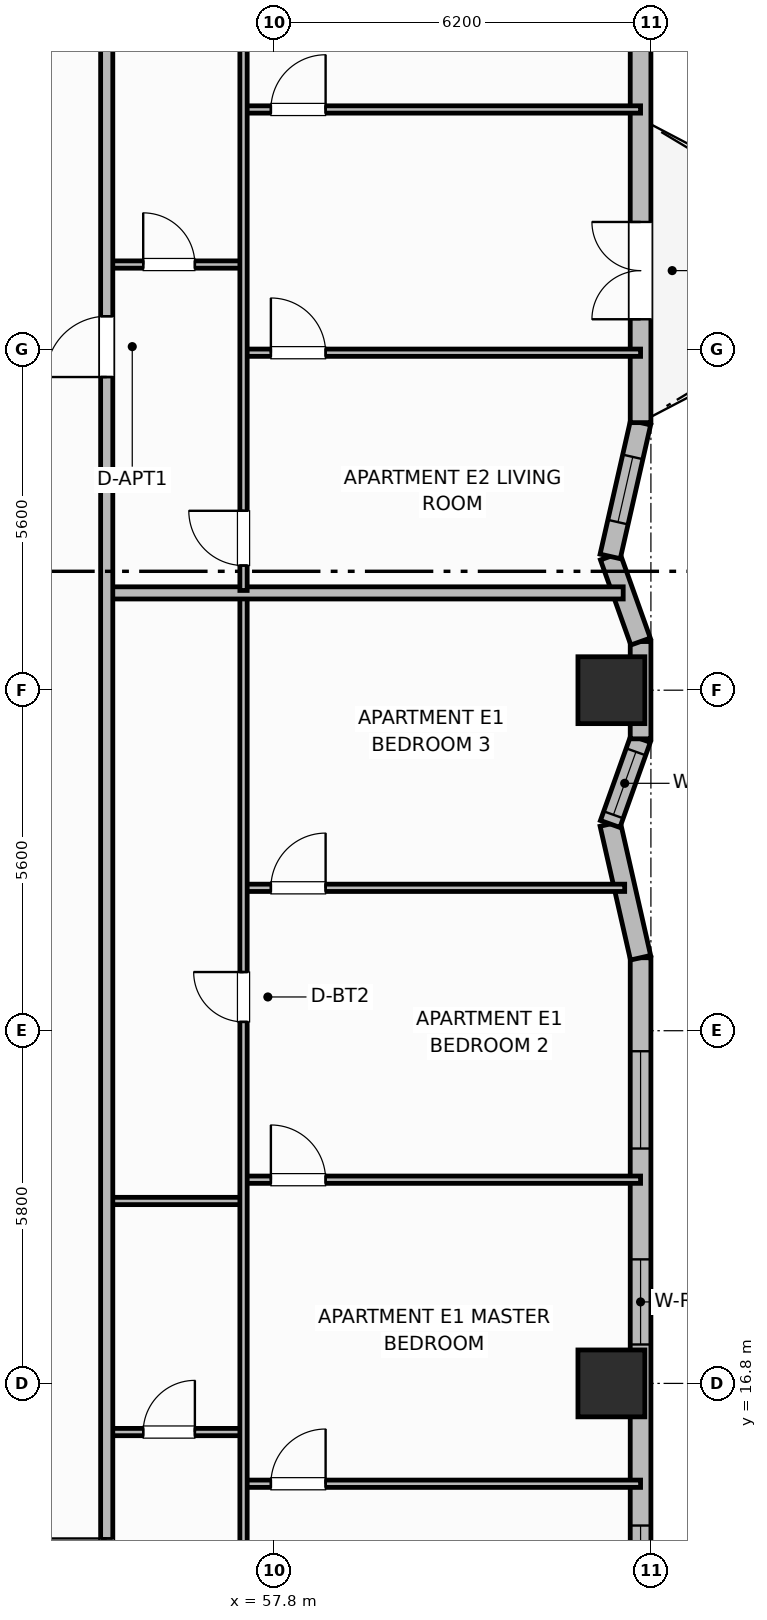
"""IFC4 building model, lengths in metres.
Left out: names, types, materials, properties, quantities, classifications, styles, units other than length and angle.
Written with IfcOpenShell. Run it as: python <this file> out.ifc"""

import sys

from ifc_helpers import new_model, si_unit, direction, frame, frame_2d, origin, origin_2d, place, context, subcontext, project, spatial, rectangle, extrude, element, fill, save


model = new_model("IFC4")
c1 = context("Model", 3, precision=1e-05, world=origin(), true_north=direction((0.0, 1.0)))
c2 = subcontext(c1, "Body", "Model", "MODEL_VIEW")
j1 = project(units=[si_unit("LENGTHUNIT", "METRE"), si_unit("PLANEANGLEUNIT", "RADIAN")], contexts=[c1])
p1 = place(None, origin())
s1 = spatial("IfcSite", under=j1, at=p1, CompositionType="ELEMENT")
p2 = place(p1, origin())
s2 = spatial("IfcBuilding", under=s1, at=p2, CompositionType="ELEMENT")
p3 = place(p2, frame((0.0, 0.0, 84.1)))
s3 = spatial("IfcBuildingStorey", under=s2, at=p3, CompositionType="ELEMENT", Elevation=84.1)
for number, where, z_axis, x_axis in (
    (1, (63.35, 16.8, 0.0), (0.0, 0.0, 1.0), (1.0, 0.0, 0.0)),
    (2, (63.35, 28.2, 0.0), (0.0, 0.0, 1.0), (1.0, 0.0, 0.0)),
):
    element("IfcColumn", number, at=place(p3, frame(where, z_axis=z_axis, x_axis=x_axis)), inside=s3, PredefinedType="COLUMN", context=c2, shape_type="SweptSolid", body=[
        extrude(rectangle(XDim=1.1, YDim=1.1, at=origin_2d()), origin(), (0.0, 0.0, 1.0), 4.2),
    ])
p4 = place(p3, frame((63.83, 9.0, 0.0), z_axis=(0.0, 0.0, 1.0), x_axis=(0.0, 1.0, 0.0)))
e3 = element("IfcWall", 3, at=p4, inside=s3, PredefinedType="SOLIDWALL", context=c2, shape_type="SweptSolid", body=[
    extrude(rectangle(XDim=14.8, YDim=0.34, at=frame_2d((7.4, 0.0))), origin(), (0.0, 0.0, 1.0), 3.2),
])
p5 = place(p4, frame((3.863, 0.0, 0.85)))
e4 = element("IfcOpeningElement", 4, at=p5, cuts=e3, PredefinedType="OPENING", context=c2, shape_type="SweptSolid", body=[
    extrude(rectangle(XDim=1.6, YDim=1.9, at=frame_2d((0.8, 0.95))), frame((0.0, 0.18, 0.0), z_axis=(0.0, -1.0, 0.0), x_axis=(1.0, 0.0, 0.0)), (0.0, 0.0, 1.0), 0.36),
])
p6 = place(p4, frame((8.44, 0.0, 0.85)))
e5 = element("IfcOpeningElement", 5, at=p6, cuts=e3, PredefinedType="OPENING", context=c2, shape_type="SweptSolid", body=[
    extrude(rectangle(XDim=1.4, YDim=1.85, at=frame_2d((0.7, 0.925))), frame((0.0, 0.18, 0.0), z_axis=(0.0, -1.0, 0.0), x_axis=(1.0, 0.0, 0.0)), (0.0, 0.0, 1.0), 0.36),
])
p7 = place(p4, frame((11.663, 0.0, 0.85)))
e6 = element("IfcOpeningElement", 6, at=p7, cuts=e3, PredefinedType="OPENING", context=c2, shape_type="SweptSolid", body=[
    extrude(rectangle(XDim=1.6, YDim=1.9, at=frame_2d((0.8, 0.95))), frame((0.0, 0.18, 0.0), z_axis=(0.0, -1.0, 0.0), x_axis=(1.0, 0.0, 0.0)), (0.0, 0.0, 1.0), 0.36),
])
p8 = place(p3, frame((63.83, 23.8, 0.0), z_axis=(0.0, 0.0, 1.0), x_axis=(-0.221625780886, 0.975131792758, 0.0)))
e7 = element("IfcWall", 7, at=p8, inside=s3, PredefinedType="SOLIDWALL", context=c2, shape_type="SweptSolid", body=[
    extrude(rectangle(XDim=2.256, YDim=0.34, at=frame_2d((1.128, 0.0))), origin(), (0.0, 0.0, 1.0), 3.2),
])
p9 = place(p3, frame((63.33, 26.0, 0.0), z_axis=(0.0, 0.0, 1.0), x_axis=(0.336357205213, 0.94173447983, 0.0)))
e8 = element("IfcWall", 8, at=p9, inside=s3, PredefinedType="SOLIDWALL", context=c2, shape_type="SweptSolid", body=[
    extrude(rectangle(XDim=1.487, YDim=0.34, at=frame_2d((0.743, 0.0))), origin(), (0.0, 0.0, 1.0), 3.2),
])
p10 = place(p9, frame((0.16, 0.0, 0.95)))
e9 = element("IfcOpeningElement", 9, at=p10, cuts=e8, PredefinedType="OPENING", context=c2, shape_type="SweptSolid", body=[
    extrude(rectangle(XDim=1.1, YDim=1.65, at=frame_2d((0.55, 0.825))), frame((0.0, 0.18, 0.0), z_axis=(0.0, -1.0, 0.0), x_axis=(1.0, 0.0, 0.0)), (0.0, 0.0, 1.0), 0.36),
])
p11 = place(p3, frame((63.83, 27.4, 0.0), z_axis=(0.0, 0.0, 1.0), x_axis=(0.0, 1.0, 0.0)))
e10 = element("IfcWall", 10, at=p11, inside=s3, PredefinedType="SOLIDWALL", context=c2, shape_type="SweptSolid", body=[
    extrude(rectangle(XDim=1.6, YDim=0.34, at=frame_2d((0.8, 0.0))), origin(), (0.0, 0.0, 1.0), 3.2),
])
p12 = place(p3, frame((63.83, 29.0, 0.0), z_axis=(0.0, 0.0, 1.0), x_axis=(-0.336357205213, 0.94173447983, 0.0)))
e11 = element("IfcWall", 11, at=p12, inside=s3, PredefinedType="SOLIDWALL", context=c2, shape_type="SweptSolid", body=[
    extrude(rectangle(XDim=1.487, YDim=0.34, at=frame_2d((0.743, 0.0))), origin(), (0.0, 0.0, 1.0), 3.2),
])
p13 = place(p3, frame((63.33, 30.4, 0.0), z_axis=(0.0, 0.0, 1.0), x_axis=(0.221602396322, 0.975137107254, 0.0)))
e12 = element("IfcWall", 12, at=p13, inside=s3, PredefinedType="SOLIDWALL", context=c2, shape_type="SweptSolid", body=[
    extrude(rectangle(XDim=2.256, YDim=0.34, at=frame_2d((1.128, 0.0))), origin(), (0.0, 0.0, 1.0), 3.2),
])
p14 = place(p13, frame((0.578, 0.0, 0.95)))
e13 = element("IfcOpeningElement", 13, at=p14, cuts=e12, PredefinedType="OPENING", context=c2, shape_type="SweptSolid", body=[
    extrude(rectangle(XDim=1.1, YDim=1.65, at=frame_2d((0.55, 0.825))), frame((0.0, 0.18, 0.0), z_axis=(0.0, -1.0, 0.0), x_axis=(1.0, 0.0, 0.0)), (0.0, 0.0, 1.0), 0.36),
])
p15 = place(p3, frame((63.83, 32.6, 0.0), z_axis=(0.0, 0.0, 1.0), x_axis=(0.0, 1.0, 0.0)))
e14 = element("IfcWall", 14, at=p15, inside=s3, PredefinedType="SOLIDWALL", context=c2, shape_type="SweptSolid", body=[
    extrude(rectangle(XDim=14.8, YDim=0.34, at=frame_2d((7.4, 0.0))), origin(), (0.0, 0.0, 1.0), 3.2),
])
p16 = place(p15, frame((1.7, 0.0, 0.0)))
e15 = element("IfcOpeningElement", 15, at=p16, cuts=e14, PredefinedType="OPENING", context=c2, shape_type="SweptSolid", body=[
    extrude(rectangle(XDim=1.6, YDim=2.1, at=frame_2d((0.8, 1.05))), frame((0.0, 0.18, 0.0), z_axis=(0.0, -1.0, 0.0), x_axis=(1.0, 0.0, 0.0)), (0.0, 0.0, 1.0), 0.36),
])
p17 = place(p15, frame((7.6, 0.0, 0.95)))
e16 = element("IfcOpeningElement", 16, at=p17, cuts=e14, PredefinedType="OPENING", context=c2, shape_type="SweptSolid", body=[
    extrude(rectangle(XDim=1.1, YDim=1.65, at=frame_2d((0.55, 0.825))), frame((0.0, 0.18, 0.0), z_axis=(0.0, -1.0, 0.0), x_axis=(1.0, 0.0, 0.0)), (0.0, 0.0, 1.0), 0.36),
])
p18 = place(p15, frame((10.48, 0.0, 0.85)))
e17 = element("IfcOpeningElement", 17, at=p18, cuts=e14, PredefinedType="OPENING", context=c2, shape_type="SweptSolid", body=[
    extrude(rectangle(XDim=1.4, YDim=1.85, at=frame_2d((0.7, 0.925))), frame((0.0, 0.18, 0.0), z_axis=(0.0, -1.0, 0.0), x_axis=(1.0, 0.0, 0.0)), (0.0, 0.0, 1.0), 0.36),
])
p19 = place(p3, frame((55.05, 16.0, 0.0), z_axis=(0.0, 0.0, 1.0), x_axis=(1.0, 0.0, 0.0)))
e18 = element("IfcWall", 18, at=p19, inside=s3, PredefinedType="PARTITIONING", context=c2, shape_type="SweptSolid", body=[
    extrude(rectangle(XDim=2.25, YDim=0.12, at=frame_2d((1.125, 0.0))), origin(), (0.0, 0.0, 1.0), 3.03),
])
p20 = place(p19, frame((0.6, 0.0, 0.0)))
e19 = element("IfcOpeningElement", 19, at=p20, cuts=e18, PredefinedType="OPENING", context=c2, shape_type="SweptSolid", body=[
    extrude(rectangle(XDim=0.85, YDim=2.1, at=frame_2d((0.425, 1.05))), frame((0.0, 0.07, 0.0), z_axis=(0.0, -1.0, 0.0), x_axis=(1.0, 0.0, 0.0)), (0.0, 0.0, 1.0), 0.14),
])
p21 = place(p3, frame((55.05, 19.8, 0.0), z_axis=(0.0, 0.0, 1.0), x_axis=(1.0, 0.0, 0.0)))
e20 = element("IfcWall", 20, at=p21, inside=s3, PredefinedType="PARTITIONING", context=c2, shape_type="SweptSolid", body=[
    extrude(rectangle(XDim=2.25, YDim=0.12, at=frame_2d((1.125, 0.0))), origin(), (0.0, 0.0, 1.0), 3.03),
])
p22 = place(p3, frame((57.3, 15.15, 0.0), z_axis=(0.0, 0.0, 1.0), x_axis=(1.0, 0.0, 0.0)))
e21 = element("IfcWall", 21, at=p22, inside=s3, PredefinedType="PARTITIONING", context=c2, shape_type="SweptSolid", body=[
    extrude(rectangle(XDim=6.53, YDim=0.12, at=frame_2d((3.265, 0.0))), origin(), (0.0, 0.0, 1.0), 3.03),
])
p23 = place(p22, frame((0.45, 0.0, 0.0)))
e22 = element("IfcOpeningElement", 22, at=p23, cuts=e21, PredefinedType="OPENING", context=c2, shape_type="SweptSolid", body=[
    extrude(rectangle(XDim=0.9, YDim=2.1, at=frame_2d((0.45, 1.05))), frame((0.0, 0.07, 0.0), z_axis=(0.0, -1.0, 0.0), x_axis=(1.0, 0.0, 0.0)), (0.0, 0.0, 1.0), 0.14),
])
p24 = place(p3, frame((57.3, 20.15, 0.0), z_axis=(0.0, 0.0, 1.0), x_axis=(1.0, 0.0, 0.0)))
e23 = element("IfcWall", 23, at=p24, inside=s3, PredefinedType="PARTITIONING", context=c2, shape_type="SweptSolid", body=[
    extrude(rectangle(XDim=6.53, YDim=0.12, at=frame_2d((3.265, 0.0))), origin(), (0.0, 0.0, 1.0), 3.03),
])
p25 = place(p24, frame((0.45, 0.0, 0.0)))
e24 = element("IfcOpeningElement", 24, at=p25, cuts=e23, PredefinedType="OPENING", context=c2, shape_type="SweptSolid", body=[
    extrude(rectangle(XDim=0.9, YDim=2.1, at=frame_2d((0.45, 1.05))), frame((0.0, 0.07, 0.0), z_axis=(0.0, -1.0, 0.0), x_axis=(1.0, 0.0, 0.0)), (0.0, 0.0, 1.0), 0.14),
])
p26 = place(p3, frame((57.3, 24.95, 0.0), z_axis=(0.0, 0.0, 1.0), x_axis=(1.0, 0.0, 0.0)))
e25 = element("IfcWall", 25, at=p26, inside=s3, PredefinedType="PARTITIONING", context=c2, shape_type="SweptSolid", body=[
    extrude(rectangle(XDim=6.269, YDim=0.12, at=frame_2d((3.134, 0.0))), origin(), (0.0, 0.0, 1.0), 3.03),
])
p27 = place(p26, frame((0.45, 0.0, 0.0)))
e26 = element("IfcOpeningElement", 26, at=p27, cuts=e25, PredefinedType="OPENING", context=c2, shape_type="SweptSolid", body=[
    extrude(rectangle(XDim=0.9, YDim=2.1, at=frame_2d((0.45, 1.05))), frame((0.0, 0.07, 0.0), z_axis=(0.0, -1.0, 0.0), x_axis=(1.0, 0.0, 0.0)), (0.0, 0.0, 1.0), 0.14),
])
p28 = place(p3, frame((57.3, 10.64, 0.0), z_axis=(0.0, 0.0, 1.0), x_axis=(0.0, 1.0, 0.0)))
e27 = element("IfcWall", 27, at=p28, inside=s3, PredefinedType="PARTITIONING", context=c2, shape_type="SweptSolid", body=[
    extrude(rectangle(XDim=19.12, YDim=0.12, at=frame_2d((9.56, 0.0))), origin(), (0.0, 0.0, 1.0), 3.03),
])
p29 = place(p28, frame((0.41, 0.0, 0.0)))
e28 = element("IfcOpeningElement", 28, at=p29, cuts=e27, PredefinedType="OPENING", context=c2, shape_type="SweptSolid", body=[
    extrude(rectangle(XDim=0.9, YDim=2.1, at=frame_2d((0.45, 1.05))), frame((0.0, 0.07, 0.0), z_axis=(0.0, -1.0, 0.0), x_axis=(1.0, 0.0, 0.0)), (0.0, 0.0, 1.0), 0.14),
])
p30 = place(p28, frame((12.105, 0.0, 0.0)))
e29 = element("IfcOpeningElement", 29, at=p30, cuts=e27, PredefinedType="OPENING", context=c2, shape_type="SweptSolid", body=[
    extrude(rectangle(XDim=0.82, YDim=2.08, at=frame_2d((0.41, 1.04))), frame((0.0, 0.07, 0.0), z_axis=(0.0, -1.0, 0.0), x_axis=(1.0, 0.0, 0.0)), (0.0, 0.0, 1.0), 0.14),
])
p31 = place(p3, frame((55.05, 29.8, 0.0), z_axis=(0.0, 0.0, 1.0), x_axis=(1.0, 0.0, 0.0)))
e30 = element("IfcWall", 30, at=p31, inside=s3, PredefinedType="PARTITIONING", context=c2, shape_type="SweptSolid", body=[
    extrude(rectangle(XDim=8.494, YDim=0.2, at=frame_2d((4.247, 0.0))), origin(), (0.0, 0.0, 1.0), 3.03),
])
p32 = place(p3, frame((55.05, 35.2, 0.0), z_axis=(0.0, 0.0, 1.0), x_axis=(1.0, 0.0, 0.0)))
e31 = element("IfcWall", 31, at=p32, inside=s3, PredefinedType="PARTITIONING", context=c2, shape_type="SweptSolid", body=[
    extrude(rectangle(XDim=2.25, YDim=0.12, at=frame_2d((1.125, 0.0))), origin(), (0.0, 0.0, 1.0), 3.03),
])
p33 = place(p32, frame((0.6, 0.0, 0.0)))
e32 = element("IfcOpeningElement", 32, at=p33, cuts=e31, PredefinedType="OPENING", context=c2, shape_type="SweptSolid", body=[
    extrude(rectangle(XDim=0.85, YDim=2.1, at=frame_2d((0.425, 1.05))), frame((0.0, 0.07, 0.0), z_axis=(0.0, -1.0, 0.0), x_axis=(1.0, 0.0, 0.0)), (0.0, 0.0, 1.0), 0.14),
])
p34 = place(p3, frame((57.3, 33.75, 0.0), z_axis=(0.0, 0.0, 1.0), x_axis=(1.0, 0.0, 0.0)))
e33 = element("IfcWall", 33, at=p34, inside=s3, PredefinedType="PARTITIONING", context=c2, shape_type="SweptSolid", body=[
    extrude(rectangle(XDim=6.53, YDim=0.12, at=frame_2d((3.265, 0.0))), origin(), (0.0, 0.0, 1.0), 3.03),
])
p35 = place(p34, frame((0.45, 0.0, 0.0)))
e34 = element("IfcOpeningElement", 34, at=p35, cuts=e33, PredefinedType="OPENING", context=c2, shape_type="SweptSolid", body=[
    extrude(rectangle(XDim=0.9, YDim=2.1, at=frame_2d((0.45, 1.05))), frame((0.0, 0.07, 0.0), z_axis=(0.0, -1.0, 0.0), x_axis=(1.0, 0.0, 0.0)), (0.0, 0.0, 1.0), 0.14),
])
p36 = place(p3, frame((57.3, 37.75, 0.0), z_axis=(0.0, 0.0, 1.0), x_axis=(1.0, 0.0, 0.0)))
e35 = element("IfcWall", 35, at=p36, inside=s3, PredefinedType="PARTITIONING", context=c2, shape_type="SweptSolid", body=[
    extrude(rectangle(XDim=6.53, YDim=0.12, at=frame_2d((3.265, 0.0))), origin(), (0.0, 0.0, 1.0), 3.03),
])
p37 = place(p36, frame((0.45, 0.0, 0.0)))
e36 = element("IfcOpeningElement", 36, at=p37, cuts=e35, PredefinedType="OPENING", context=c2, shape_type="SweptSolid", body=[
    extrude(rectangle(XDim=0.9, YDim=2.1, at=frame_2d((0.45, 1.05))), frame((0.0, 0.07, 0.0), z_axis=(0.0, -1.0, 0.0), x_axis=(1.0, 0.0, 0.0)), (0.0, 0.0, 1.0), 0.14),
])
p38 = place(p3, frame((57.3, 29.84, 0.0), z_axis=(0.0, 0.0, 1.0), x_axis=(0.0, 1.0, 0.0)))
e37 = element("IfcWall", 37, at=p38, inside=s3, PredefinedType="PARTITIONING", context=c2, shape_type="SweptSolid", body=[
    extrude(rectangle(XDim=15.92, YDim=0.12, at=frame_2d((7.96, 0.0))), origin(), (0.0, 0.0, 1.0), 3.03),
])
p39 = place(p38, frame((0.41, 0.0, 0.0)))
e38 = element("IfcOpeningElement", 38, at=p39, cuts=e37, PredefinedType="OPENING", context=c2, shape_type="SweptSolid", body=[
    extrude(rectangle(XDim=0.9, YDim=2.1, at=frame_2d((0.45, 1.05))), frame((0.0, 0.07, 0.0), z_axis=(0.0, -1.0, 0.0), x_axis=(1.0, 0.0, 0.0)), (0.0, 0.0, 1.0), 0.14),
])
p40 = place(p38, frame((13.125, 0.0, 0.0)))
e39 = element("IfcOpeningElement", 39, at=p40, cuts=e37, PredefinedType="OPENING", context=c2, shape_type="SweptSolid", body=[
    extrude(rectangle(XDim=0.82, YDim=2.08, at=frame_2d((0.41, 1.04))), frame((0.0, 0.07, 0.0), z_axis=(0.0, -1.0, 0.0), x_axis=(1.0, 0.0, 0.0)), (0.0, 0.0, 1.0), 0.14),
])
p41 = place(p3, frame((55.05, 10.6, 0.0), z_axis=(0.0, 0.0, 1.0), x_axis=(0.0, 1.0, 0.0)))
e40 = element("IfcWall", 40, at=p41, inside=s3, PredefinedType="PARTITIONING", context=c2, shape_type="SweptSolid", body=[
    extrude(rectangle(XDim=35.2, YDim=0.2, at=frame_2d((17.6, 0.0))), origin(), (0.0, 0.0, 1.0), 3.03),
])
p42 = place(p41, frame((2.65, 0.0, 0.0)))
e41 = element("IfcOpeningElement", 41, at=p42, cuts=e40, PredefinedType="OPENING", context=c2, shape_type="SweptSolid", body=[
    extrude(rectangle(XDim=1.0, YDim=2.15, at=frame_2d((0.5, 1.075))), frame((0.0, 0.11, 0.0), z_axis=(0.0, -1.0, 0.0), x_axis=(1.0, 0.0, 0.0)), (0.0, 0.0, 1.0), 0.22),
])
p43 = place(p41, frame((22.75, 0.0, 0.0)))
e42 = element("IfcOpeningElement", 42, at=p43, cuts=e40, PredefinedType="OPENING", context=c2, shape_type="SweptSolid", body=[
    extrude(rectangle(XDim=1.0, YDim=2.15, at=frame_2d((0.5, 1.075))), frame((0.0, 0.11, 0.0), z_axis=(0.0, -1.0, 0.0), x_axis=(1.0, 0.0, 0.0)), (0.0, 0.0, 1.0), 0.22),
])
p44 = place(p5, origin())
e43 = element("IfcWindow", 43, at=p44, inside=s3, PartitioningType="SINGLE_PANEL", PredefinedType="WINDOW", context=c2, shape_type="SweptSolid", body=[
    extrude(rectangle(XDim=1.6, YDim=1.9, at=frame_2d((0.8, 0.95))), frame((0.0, 0.03, 0.0), z_axis=(0.0, -1.0, 0.0), x_axis=(1.0, 0.0, 0.0)), (0.0, 0.0, 1.0), 0.06),
])
fill(e4, e43)
p45 = place(p6, origin())
e44 = element("IfcWindow", 44, at=p45, inside=s3, PartitioningType="SINGLE_PANEL", PredefinedType="WINDOW", context=c2, shape_type="SweptSolid", body=[
    extrude(rectangle(XDim=1.4, YDim=1.85, at=frame_2d((0.7, 0.925))), frame((0.0, 0.03, 0.0), z_axis=(0.0, -1.0, 0.0), x_axis=(1.0, 0.0, 0.0)), (0.0, 0.0, 1.0), 0.06),
])
fill(e5, e44)
p46 = place(p7, origin())
e45 = element("IfcWindow", 45, at=p46, inside=s3, PartitioningType="SINGLE_PANEL", PredefinedType="WINDOW", context=c2, shape_type="SweptSolid", body=[
    extrude(rectangle(XDim=1.6, YDim=1.9, at=frame_2d((0.8, 0.95))), frame((0.0, 0.03, 0.0), z_axis=(0.0, -1.0, 0.0), x_axis=(1.0, 0.0, 0.0)), (0.0, 0.0, 1.0), 0.06),
])
fill(e6, e45)
p47 = place(p10, origin())
e46 = element("IfcWindow", 46, at=p47, inside=s3, PartitioningType="SINGLE_PANEL", PredefinedType="WINDOW", context=c2, shape_type="SweptSolid", body=[
    extrude(rectangle(XDim=1.1, YDim=1.65, at=frame_2d((0.55, 0.825))), frame((0.0, 0.03, 0.0), z_axis=(0.0, -1.0, 0.0), x_axis=(1.0, 0.0, 0.0)), (0.0, 0.0, 1.0), 0.06),
])
fill(e9, e46)
p48 = place(p14, origin())
e47 = element("IfcWindow", 47, at=p48, inside=s3, PartitioningType="SINGLE_PANEL", PredefinedType="WINDOW", context=c2, shape_type="SweptSolid", body=[
    extrude(rectangle(XDim=1.1, YDim=1.65, at=frame_2d((0.55, 0.825))), frame((0.0, 0.03, 0.0), z_axis=(0.0, -1.0, 0.0), x_axis=(1.0, 0.0, 0.0)), (0.0, 0.0, 1.0), 0.06),
])
fill(e13, e47)
p49 = place(p16, origin())
e48 = element("IfcDoor", 48, at=p49, inside=s3, OperationType="DOUBLE_DOOR_SINGLE_SWING", PredefinedType="DOOR", context=c2, shape_type="SweptSolid", body=[
    extrude(rectangle(XDim=1.6, YDim=2.1, at=frame_2d((0.8, 1.05))), frame((0.0, 0.025, 0.0), z_axis=(0.0, -1.0, 0.0), x_axis=(1.0, 0.0, 0.0)), (0.0, 0.0, 1.0), 0.05),
])
fill(e15, e48)
p50 = place(p20, origin())
e49 = element("IfcDoor", 49, at=p50, inside=s3, OperationType="SINGLE_SWING_RIGHT", PredefinedType="DOOR", context=c2, shape_type="SweptSolid", body=[
    extrude(rectangle(XDim=0.85, YDim=2.1, at=frame_2d((0.425, 1.05))), frame((0.0, 0.025, 0.0), z_axis=(0.0, -1.0, 0.0), x_axis=(1.0, 0.0, 0.0)), (0.0, 0.0, 1.0), 0.05),
])
fill(e19, e49)
p51 = place(p23, origin())
e50 = element("IfcDoor", 50, at=p51, inside=s3, OperationType="SINGLE_SWING_RIGHT", PredefinedType="DOOR", context=c2, shape_type="SweptSolid", body=[
    extrude(rectangle(XDim=0.9, YDim=2.1, at=frame_2d((0.45, 1.05))), frame((0.0, 0.025, 0.0), z_axis=(0.0, -1.0, 0.0), x_axis=(1.0, 0.0, 0.0)), (0.0, 0.0, 1.0), 0.05),
])
fill(e22, e50)
p52 = place(p25, origin())
e51 = element("IfcDoor", 51, at=p52, inside=s3, OperationType="SINGLE_SWING_LEFT", PredefinedType="DOOR", context=c2, shape_type="SweptSolid", body=[
    extrude(rectangle(XDim=0.9, YDim=2.1, at=frame_2d((0.45, 1.05))), frame((0.0, 0.025, 0.0), z_axis=(0.0, -1.0, 0.0), x_axis=(1.0, 0.0, 0.0)), (0.0, 0.0, 1.0), 0.05),
])
fill(e24, e51)
p53 = place(p27, origin())
e52 = element("IfcDoor", 52, at=p53, inside=s3, OperationType="SINGLE_SWING_RIGHT", PredefinedType="DOOR", context=c2, shape_type="SweptSolid", body=[
    extrude(rectangle(XDim=0.9, YDim=2.1, at=frame_2d((0.45, 1.05))), frame((0.0, 0.025, 0.0), z_axis=(0.0, -1.0, 0.0), x_axis=(1.0, 0.0, 0.0)), (0.0, 0.0, 1.0), 0.05),
])
fill(e26, e52)
p54 = place(p30, origin())
e53 = element("IfcDoor", 53, at=p54, inside=s3, OperationType="SINGLE_SWING_RIGHT", PredefinedType="DOOR", context=c2, shape_type="SweptSolid", body=[
    extrude(rectangle(XDim=0.82, YDim=2.08, at=frame_2d((0.41, 1.04))), frame((0.0, 0.025, 0.0), z_axis=(0.0, -1.0, 0.0), x_axis=(1.0, 0.0, 0.0)), (0.0, 0.0, 1.0), 0.05),
])
fill(e29, e53)
p55 = place(p33, origin())
e54 = element("IfcDoor", 54, at=p55, inside=s3, OperationType="SINGLE_SWING_LEFT", PredefinedType="DOOR", context=c2, shape_type="SweptSolid", body=[
    extrude(rectangle(XDim=0.85, YDim=2.1, at=frame_2d((0.425, 1.05))), frame((0.0, 0.025, 0.0), z_axis=(0.0, -1.0, 0.0), x_axis=(1.0, 0.0, 0.0)), (0.0, 0.0, 1.0), 0.05),
])
fill(e32, e54)
p56 = place(p35, origin())
e55 = element("IfcDoor", 55, at=p56, inside=s3, OperationType="SINGLE_SWING_LEFT", PredefinedType="DOOR", context=c2, shape_type="SweptSolid", body=[
    extrude(rectangle(XDim=0.9, YDim=2.1, at=frame_2d((0.45, 1.05))), frame((0.0, 0.025, 0.0), z_axis=(0.0, -1.0, 0.0), x_axis=(1.0, 0.0, 0.0)), (0.0, 0.0, 1.0), 0.05),
])
fill(e34, e55)
p57 = place(p37, origin())
e56 = element("IfcDoor", 56, at=p57, inside=s3, OperationType="SINGLE_SWING_RIGHT", PredefinedType="DOOR", context=c2, shape_type="SweptSolid", body=[
    extrude(rectangle(XDim=0.9, YDim=2.1, at=frame_2d((0.45, 1.05))), frame((0.0, 0.025, 0.0), z_axis=(0.0, -1.0, 0.0), x_axis=(1.0, 0.0, 0.0)), (0.0, 0.0, 1.0), 0.05),
])
fill(e36, e56)
p58 = place(p39, origin())
e57 = element("IfcDoor", 57, at=p58, inside=s3, OperationType="SINGLE_SWING_RIGHT", PredefinedType="DOOR", context=c2, shape_type="SweptSolid", body=[
    extrude(rectangle(XDim=0.9, YDim=2.1, at=frame_2d((0.45, 1.05))), frame((0.0, 0.025, 0.0), z_axis=(0.0, -1.0, 0.0), x_axis=(1.0, 0.0, 0.0)), (0.0, 0.0, 1.0), 0.05),
])
fill(e38, e57)
p59 = place(p42, origin())
e58 = element("IfcDoor", 58, at=p59, inside=s3, OperationType="SINGLE_SWING_RIGHT", PredefinedType="DOOR", context=c2, shape_type="SweptSolid", body=[
    extrude(rectangle(XDim=1.0, YDim=2.15, at=frame_2d((0.5, 1.075))), frame((0.0, 0.025, 0.0), z_axis=(0.0, -1.0, 0.0), x_axis=(1.0, 0.0, 0.0)), (0.0, 0.0, 1.0), 0.05),
])
fill(e41, e58)
p60 = place(p43, origin())
e59 = element("IfcDoor", 59, at=p60, inside=s3, OperationType="SINGLE_SWING_LEFT", PredefinedType="DOOR", context=c2, shape_type="SweptSolid", body=[
    extrude(rectangle(XDim=1.0, YDim=2.15, at=frame_2d((0.5, 1.075))), frame((0.0, 0.025, 0.0), z_axis=(0.0, -1.0, 0.0), x_axis=(1.0, 0.0, 0.0)), (0.0, 0.0, 1.0), 0.05),
])
fill(e42, e59)
save(model, sys.argv[1])
